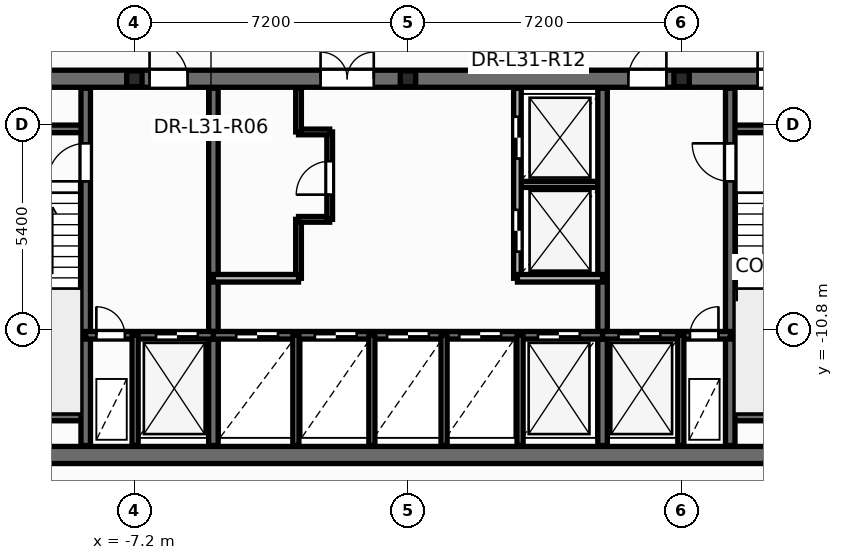
"""IFC4 building model, lengths in metres.
Left out: names, types, materials, properties, quantities, classifications, styles, units other than length and angle.
Written with IfcOpenShell. Run it as: python <this file> out.ifc"""

import sys

from ifc_helpers import new_model, si_unit, direction, frame, frame_2d, origin, origin_2d, place, context, subcontext, project, spatial, rectangle, i_section, extrude, element, fill, save


model = new_model("IFC4")
c1 = context("Model", 3, precision=1e-05, world=origin(), true_north=direction((0.0, 1.0)))
c2 = subcontext(c1, "Body", "Model", "MODEL_VIEW")
j1 = project(units=[si_unit("LENGTHUNIT", "METRE"), si_unit("PLANEANGLEUNIT", "RADIAN")], contexts=[c1])
p1 = place(None, origin())
s1 = spatial("IfcSite", under=j1, at=p1, CompositionType="ELEMENT")
p2 = place(p1, origin())
s2 = spatial("IfcBuilding", under=s1, at=p2, CompositionType="ELEMENT")
p3 = place(p2, frame((0.0, 0.0, 122.1)))
s3 = spatial("IfcBuildingStorey", under=s2, at=p3, CompositionType="ELEMENT", Elevation=122.1)
for number, where, z_axis, x_axis in (
    (1, (-7.2, -4.2, 0.0), (0.0, 0.0, 1.0), (1.0, 0.0, 0.0)),
    (2, (0.0, -4.2, 0.0), (0.0, 0.0, 1.0), (1.0, 0.0, 0.0)),
    (3, (7.2, -4.2, 0.0), (0.0, 0.0, 1.0), (1.0, 0.0, 0.0)),
):
    element("IfcColumn", number, at=place(p3, frame(where, z_axis=z_axis, x_axis=x_axis)), inside=s3, PredefinedType="PILASTER", context=c2, shape_type="SweptSolid", body=[
        extrude(i_section(OverallWidth=0.405, OverallDepth=0.414, WebThickness=0.022, FlangeThickness=0.032, at=origin_2d()), origin(), (0.0, 0.0, 1.0), 3.6),
    ])
p4 = place(p3, frame((-2.88, -9.45, 0.0), z_axis=(0.0, 0.0, 1.0), x_axis=(0.0, 1.0, 0.0)))
e4 = element("IfcWall", 4, at=p4, inside=s3, PredefinedType="PARTITIONING", context=c2, shape_type="SweptSolid", body=[
    extrude(rectangle(XDim=1.55, YDim=0.15, at=frame_2d((0.775, 0.0))), origin(), (0.0, 0.0, 1.0), 3.35),
])
p5 = place(p3, frame((-2.88, -7.9, 0.0), z_axis=(0.0, 0.0, 1.0), x_axis=(1.0, 0.0, 0.0)))
e5 = element("IfcWall", 5, at=p5, inside=s3, PredefinedType="PARTITIONING", context=c2, shape_type="SweptSolid", body=[
    extrude(rectangle(XDim=0.82, YDim=0.15, at=frame_2d((0.41, 0.0))), origin(), (0.0, 0.0, 1.0), 3.35),
])
p6 = place(p3, frame((-2.06, -7.9, 0.0), z_axis=(0.0, 0.0, 1.0), x_axis=(0.0, 1.0, 0.0)))
e6 = element("IfcWall", 6, at=p6, inside=s3, PredefinedType="PARTITIONING", context=c2, shape_type="SweptSolid", body=[
    extrude(rectangle(XDim=2.3, YDim=0.15, at=frame_2d((1.15, 0.0))), origin(), (0.0, 0.0, 1.0), 3.35),
])
p7 = place(p6, frame((0.65, 0.0, 0.0)))
e7 = element("IfcOpeningElement", 7, at=p7, cuts=e6, PredefinedType="OPENING", context=c2, shape_type="SweptSolid", body=[
    extrude(rectangle(XDim=0.886, YDim=2.104, at=frame_2d((0.44, 1.052))), frame((0.0, 0.085, 0.0), z_axis=(0.0, -1.0, 0.0), x_axis=(1.0, 0.0, 0.0)), (0.0, 0.0, 1.0), 0.17),
])
p8 = place(p3, frame((-2.88, -5.6, 0.0), z_axis=(0.0, 0.0, 1.0), x_axis=(1.0, 0.0, 0.0)))
e8 = element("IfcWall", 8, at=p8, inside=s3, PredefinedType="PARTITIONING", context=c2, shape_type="SweptSolid", body=[
    extrude(rectangle(XDim=0.82, YDim=0.15, at=frame_2d((0.41, 0.0))), origin(), (0.0, 0.0, 1.0), 3.35),
])
p9 = place(p3, frame((-2.88, -5.6, 0.0), z_axis=(0.0, 0.0, 1.0), x_axis=(0.0, 1.0, 0.0)))
e9 = element("IfcWall", 9, at=p9, inside=s3, PredefinedType="PARTITIONING", context=c2, shape_type="SweptSolid", body=[
    extrude(rectangle(XDim=1.15, YDim=0.15, at=frame_2d((0.575, 0.0))), origin(), (0.0, 0.0, 1.0), 3.35),
])
p10 = place(p3, frame((2.88, -6.98, 0.0), z_axis=(0.0, 0.0, 1.0), x_axis=(1.0, 0.0, 0.0)))
e10 = element("IfcWall", 10, at=p10, inside=s3, PredefinedType="PARTITIONING", context=c2, shape_type="SweptSolid", body=[
    extrude(rectangle(XDim=2.24, YDim=0.16, at=frame_2d((1.12, 0.0))), origin(), (0.0, 0.0, 1.0), 3.35),
])
p11 = place(p3, frame((-12.65, -14.1, 0.0), z_axis=(0.0, 0.0, 1.0), x_axis=(1.0, 0.0, 0.0)))
e11 = element("IfcWall", 11, at=p11, inside=s3, PredefinedType="SHEAR", context=c2, shape_type="SweptSolid", body=[
    extrude(rectangle(XDim=25.3, YDim=0.45, at=frame_2d((12.65, 0.0))), origin(), (0.0, 0.0, 1.0), 3.6),
])
p12 = place(p3, frame((-12.65, -4.2, 0.0), z_axis=(0.0, 0.0, 1.0), x_axis=(1.0, 0.0, 0.0)))
e12 = element("IfcWall", 12, at=p12, inside=s3, PredefinedType="SHEAR", context=c2, shape_type="SweptSolid", body=[
    extrude(rectangle(XDim=25.3, YDim=0.45, at=frame_2d((12.65, 0.0))), origin(), (0.0, 0.0, 1.0), 3.6),
])
p13 = place(p12, frame((1.85, 0.0, 0.0)))
e13 = element("IfcOpeningElement", 13, at=p13, cuts=e12, PredefinedType="OPENING", context=c2, shape_type="SweptSolid", body=[
    extrude(rectangle(XDim=0.756, YDim=2.054, at=frame_2d((0.375, 1.027))), frame((0.0, 0.235, 0.0), z_axis=(0.0, -1.0, 0.0), x_axis=(1.0, 0.0, 0.0)), (0.0, 0.0, 1.0), 0.47),
])
p14 = place(p12, frame((21.85, 0.0, 0.0)))
e14 = element("IfcOpeningElement", 14, at=p14, cuts=e12, PredefinedType="OPENING", context=c2, shape_type="SweptSolid", body=[
    extrude(rectangle(XDim=0.756, YDim=2.054, at=frame_2d((0.375, 1.027))), frame((0.0, 0.235, 0.0), z_axis=(0.0, -1.0, 0.0), x_axis=(1.0, 0.0, 0.0)), (0.0, 0.0, 1.0), 0.47),
])
p15 = place(p12, frame((23.5, 0.0, 0.0)))
e15 = element("IfcOpeningElement", 15, at=p15, cuts=e12, PredefinedType="OPENING", context=c2, shape_type="SweptSolid", body=[
    extrude(rectangle(XDim=0.756, YDim=2.054, at=frame_2d((0.375, 1.027))), frame((0.0, 0.235, 0.0), z_axis=(0.0, -1.0, 0.0), x_axis=(1.0, 0.0, 0.0)), (0.0, 0.0, 1.0), 0.47),
])
p16 = place(p12, frame((5.85, 0.0, 0.0)))
e16 = element("IfcOpeningElement", 16, at=p16, cuts=e12, PredefinedType="OPENING", context=c2, shape_type="SweptSolid", body=[
    extrude(rectangle(XDim=1.006, YDim=2.104, at=frame_2d((0.5, 1.052))), frame((0.0, 0.235, 0.0), z_axis=(0.0, -1.0, 0.0), x_axis=(1.0, 0.0, 0.0)), (0.0, 0.0, 1.0), 0.47),
])
p17 = place(p12, frame((10.35, 0.0, 0.0)))
e17 = element("IfcOpeningElement", 17, at=p17, cuts=e12, PredefinedType="OPENING", context=c2, shape_type="SweptSolid", body=[
    extrude(rectangle(XDim=1.406, YDim=2.154, at=frame_2d((0.7, 1.077))), frame((0.0, 0.235, 0.0), z_axis=(0.0, -1.0, 0.0), x_axis=(1.0, 0.0, 0.0)), (0.0, 0.0, 1.0), 0.47),
])
p18 = place(p12, frame((18.45, 0.0, 0.0)))
e18 = element("IfcOpeningElement", 18, at=p18, cuts=e12, PredefinedType="OPENING", context=c2, shape_type="SweptSolid", body=[
    extrude(rectangle(XDim=1.006, YDim=2.104, at=frame_2d((0.5, 1.052))), frame((0.0, 0.235, 0.0), z_axis=(0.0, -1.0, 0.0), x_axis=(1.0, 0.0, 0.0)), (0.0, 0.0, 1.0), 0.47),
])
for number, where, z_axis, x_axis in (
    (19, (-12.35, -5.52, 0.0), (0.0, 0.0, 1.0), (1.0, 0.0, 0.0)),
    (20, (-12.35, -13.1, 0.0), (0.0, 0.0, 1.0), (1.0, 0.0, 0.0)),
    (21, (8.48, -5.52, 0.0), (0.0, 0.0, 1.0), (1.0, 0.0, 0.0)),
    (22, (8.48, -13.1, 0.0), (0.0, 0.0, 1.0), (1.0, 0.0, 0.0)),
):
    element("IfcWall", number, at=place(p3, frame(where, z_axis=z_axis, x_axis=x_axis)), inside=s3, PredefinedType="SOLIDWALL", context=c2, shape_type="SweptSolid", body=[
        extrude(rectangle(XDim=3.87, YDim=0.2, at=frame_2d((1.935, 0.0))), origin(), (0.0, 0.0, 1.0), 3.6),
    ])
p19 = place(p3, frame((-8.48, -13.85, 0.0), z_axis=(0.0, 0.0, 1.0), x_axis=(0.0, 1.0, 0.0)))
e23 = element("IfcWall", 23, at=p19, inside=s3, PredefinedType="SHEAR", context=c2, shape_type="SweptSolid", body=[
    extrude(rectangle(XDim=9.4, YDim=0.25, at=frame_2d((4.7, 0.0))), origin(), (0.0, 0.0, 1.0), 3.6),
])
p20 = place(p19, frame((6.95, 0.0, 0.0)))
e24 = element("IfcOpeningElement", 24, at=p20, cuts=e23, PredefinedType="OPENING", context=c2, shape_type="SweptSolid", body=[
    extrude(rectangle(XDim=1.006, YDim=2.104, at=frame_2d((0.5, 1.052))), frame((0.0, 0.135, 0.0), z_axis=(0.0, -1.0, 0.0), x_axis=(1.0, 0.0, 0.0)), (0.0, 0.0, 1.0), 0.27),
])
p21 = place(p3, frame((8.48, -13.85, 0.0), z_axis=(0.0, 0.0, 1.0), x_axis=(0.0, 1.0, 0.0)))
e25 = element("IfcWall", 25, at=p21, inside=s3, PredefinedType="SHEAR", context=c2, shape_type="SweptSolid", body=[
    extrude(rectangle(XDim=9.4, YDim=0.25, at=frame_2d((4.7, 0.0))), origin(), (0.0, 0.0, 1.0), 3.6),
])
p22 = place(p21, frame((6.95, 0.0, 0.0)))
e26 = element("IfcOpeningElement", 26, at=p22, cuts=e25, PredefinedType="OPENING", context=c2, shape_type="SweptSolid", body=[
    extrude(rectangle(XDim=1.006, YDim=2.104, at=frame_2d((0.5, 1.052))), frame((0.0, 0.135, 0.0), z_axis=(0.0, -1.0, 0.0), x_axis=(1.0, 0.0, 0.0)), (0.0, 0.0, 1.0), 0.27),
])
for number, where, z_axis, x_axis in (
    (27, (-5.12, -13.85, 0.0), (0.0, 0.0, 1.0), (0.0, 1.0, 0.0)),
    (28, (5.12, -13.85, 0.0), (0.0, 0.0, 1.0), (0.0, 1.0, 0.0)),
):
    element("IfcWall", number, at=place(p3, frame(where, z_axis=z_axis, x_axis=x_axis)), inside=s3, PredefinedType="SHEAR", context=c2, shape_type="SweptSolid", body=[
        extrude(rectangle(XDim=9.4, YDim=0.25, at=frame_2d((4.7, 0.0))), origin(), (0.0, 0.0, 1.0), 3.6),
    ])
p23 = place(p3, frame((-8.48, -10.95, 0.0), z_axis=(0.0, 0.0, 1.0), x_axis=(1.0, 0.0, 0.0)))
e29 = element("IfcWall", 29, at=p23, inside=s3, PredefinedType="SOLIDWALL", context=c2, shape_type="SweptSolid", body=[
    extrude(rectangle(XDim=3.36, YDim=0.2, at=frame_2d((1.68, 0.0))), origin(), (0.0, 0.0, 1.0), 3.6),
])
p24 = place(p23, frame((0.28, 0.0, 0.0)))
e30 = element("IfcOpeningElement", 30, at=p24, cuts=e29, PredefinedType="OPENING", context=c2, shape_type="SweptSolid", body=[
    extrude(rectangle(XDim=0.756, YDim=2.054, at=frame_2d((0.375, 1.027))), frame((0.0, 0.11, 0.0), z_axis=(0.0, -1.0, 0.0), x_axis=(1.0, 0.0, 0.0)), (0.0, 0.0, 1.0), 0.22),
])
p25 = place(p23, frame((1.85, 0.0, 0.0)))
e31 = element("IfcOpeningElement", 31, at=p25, cuts=e29, PredefinedType="OPENING", context=c2, shape_type="SweptSolid", body=[
    extrude(rectangle(XDim=1.106, YDim=2.104, at=frame_2d((0.55, 1.052))), frame((0.0, 0.11, 0.0), z_axis=(0.0, -1.0, 0.0), x_axis=(1.0, 0.0, 0.0)), (0.0, 0.0, 1.0), 0.22),
])
p26 = place(p3, frame((-5.12, -10.95, 0.0), z_axis=(0.0, 0.0, 1.0), x_axis=(1.0, 0.0, 0.0)))
e32 = element("IfcWall", 32, at=p26, inside=s3, PredefinedType="SOLIDWALL", context=c2, shape_type="SweptSolid", body=[
    extrude(rectangle(XDim=10.24, YDim=0.2, at=frame_2d((5.12, 0.0))), origin(), (0.0, 0.0, 1.0), 3.6),
])
p27 = place(p26, frame((0.6, 0.0, 0.0)))
e33 = element("IfcOpeningElement", 33, at=p27, cuts=e32, PredefinedType="OPENING", context=c2, shape_type="SweptSolid", body=[
    extrude(rectangle(XDim=1.106, YDim=2.104, at=frame_2d((0.55, 1.052))), frame((0.0, 0.11, 0.0), z_axis=(0.0, -1.0, 0.0), x_axis=(1.0, 0.0, 0.0)), (0.0, 0.0, 1.0), 0.22),
])
p28 = place(p26, frame((2.67, 0.0, 0.0)))
e34 = element("IfcOpeningElement", 34, at=p28, cuts=e32, PredefinedType="OPENING", context=c2, shape_type="SweptSolid", body=[
    extrude(rectangle(XDim=1.106, YDim=2.104, at=frame_2d((0.55, 1.052))), frame((0.0, 0.11, 0.0), z_axis=(0.0, -1.0, 0.0), x_axis=(1.0, 0.0, 0.0)), (0.0, 0.0, 1.0), 0.22),
])
p29 = place(p26, frame((4.57, 0.0, 0.0)))
e35 = element("IfcOpeningElement", 35, at=p29, cuts=e32, PredefinedType="OPENING", context=c2, shape_type="SweptSolid", body=[
    extrude(rectangle(XDim=1.106, YDim=2.104, at=frame_2d((0.55, 1.052))), frame((0.0, 0.11, 0.0), z_axis=(0.0, -1.0, 0.0), x_axis=(1.0, 0.0, 0.0)), (0.0, 0.0, 1.0), 0.22),
])
p30 = place(p26, frame((6.47, 0.0, 0.0)))
e36 = element("IfcOpeningElement", 36, at=p30, cuts=e32, PredefinedType="OPENING", context=c2, shape_type="SweptSolid", body=[
    extrude(rectangle(XDim=1.106, YDim=2.104, at=frame_2d((0.55, 1.052))), frame((0.0, 0.11, 0.0), z_axis=(0.0, -1.0, 0.0), x_axis=(1.0, 0.0, 0.0)), (0.0, 0.0, 1.0), 0.22),
])
p31 = place(p26, frame((8.54, 0.0, 0.0)))
e37 = element("IfcOpeningElement", 37, at=p31, cuts=e32, PredefinedType="OPENING", context=c2, shape_type="SweptSolid", body=[
    extrude(rectangle(XDim=1.106, YDim=2.104, at=frame_2d((0.55, 1.052))), frame((0.0, 0.11, 0.0), z_axis=(0.0, -1.0, 0.0), x_axis=(1.0, 0.0, 0.0)), (0.0, 0.0, 1.0), 0.22),
])
p32 = place(p3, frame((5.12, -10.95, 0.0), z_axis=(0.0, 0.0, 1.0), x_axis=(1.0, 0.0, 0.0)))
e38 = element("IfcWall", 38, at=p32, inside=s3, PredefinedType="SOLIDWALL", context=c2, shape_type="SweptSolid", body=[
    extrude(rectangle(XDim=3.36, YDim=0.2, at=frame_2d((1.68, 0.0))), origin(), (0.0, 0.0, 1.0), 3.6),
])
p33 = place(p32, frame((0.42, 0.0, 0.0)))
e39 = element("IfcOpeningElement", 39, at=p33, cuts=e38, PredefinedType="OPENING", context=c2, shape_type="SweptSolid", body=[
    extrude(rectangle(XDim=1.106, YDim=2.104, at=frame_2d((0.55, 1.052))), frame((0.0, 0.11, 0.0), z_axis=(0.0, -1.0, 0.0), x_axis=(1.0, 0.0, 0.0)), (0.0, 0.0, 1.0), 0.22),
])
p34 = place(p32, frame((2.3, 0.0, 0.0)))
e40 = element("IfcOpeningElement", 40, at=p34, cuts=e38, PredefinedType="OPENING", context=c2, shape_type="SweptSolid", body=[
    extrude(rectangle(XDim=0.756, YDim=2.054, at=frame_2d((0.375, 1.027))), frame((0.0, 0.11, 0.0), z_axis=(0.0, -1.0, 0.0), x_axis=(1.0, 0.0, 0.0)), (0.0, 0.0, 1.0), 0.22),
])
for number, where, z_axis, x_axis in (
    (41, (-7.18, -13.85, 0.0), (0.0, 0.0, 1.0), (0.0, 1.0, 0.0)),
    (42, (7.18, -13.85, 0.0), (0.0, 0.0, 1.0), (0.0, 1.0, 0.0)),
    (43, (-2.95, -13.85, 0.0), (0.0, 0.0, 1.0), (0.0, 1.0, 0.0)),
    (44, (2.95, -13.85, 0.0), (0.0, 0.0, 1.0), (0.0, 1.0, 0.0)),
):
    element("IfcWall", number, at=place(p3, frame(where, z_axis=z_axis, x_axis=x_axis)), inside=s3, PredefinedType="PARTITIONING", context=c2, shape_type="SweptSolid", body=[
        extrude(rectangle(XDim=2.9, YDim=0.16, at=frame_2d((1.45, 0.0))), origin(), (0.0, 0.0, 1.0), 2.475),
    ])
p35 = place(p3, frame((-5.12, -9.45, 0.0), z_axis=(0.0, 0.0, 1.0), x_axis=(1.0, 0.0, 0.0)))
e45 = element("IfcWall", 45, at=p35, inside=s3, PredefinedType="SOLIDWALL", context=c2, shape_type="SweptSolid", body=[
    extrude(rectangle(XDim=2.24, YDim=0.2, at=frame_2d((1.12, 0.0))), origin(), (0.0, 0.0, 1.0), 3.35),
])
p36 = place(p3, frame((2.88, -9.45, 0.0), z_axis=(0.0, 0.0, 1.0), x_axis=(0.0, 1.0, 0.0)))
e46 = element("IfcWall", 46, at=p36, inside=s3, PredefinedType="SOLIDWALL", context=c2, shape_type="SweptSolid", body=[
    extrude(rectangle(XDim=5.0, YDim=0.2, at=frame_2d((2.5, 0.0))), origin(), (0.0, 0.0, 1.0), 3.35),
])
p37 = place(p36, frame((0.7, 0.0, 0.0)))
e47 = element("IfcOpeningElement", 47, at=p37, cuts=e46, PredefinedType="OPENING", context=c2, shape_type="SweptSolid", body=[
    extrude(rectangle(XDim=1.106, YDim=2.104, at=frame_2d((0.55, 1.052))), frame((0.0, 0.11, 0.0), z_axis=(0.0, -1.0, 0.0), x_axis=(1.0, 0.0, 0.0)), (0.0, 0.0, 1.0), 0.22),
])
p38 = place(p36, frame((3.15, 0.0, 0.0)))
e48 = element("IfcOpeningElement", 48, at=p38, cuts=e46, PredefinedType="OPENING", context=c2, shape_type="SweptSolid", body=[
    extrude(rectangle(XDim=1.106, YDim=2.104, at=frame_2d((0.55, 1.052))), frame((0.0, 0.11, 0.0), z_axis=(0.0, -1.0, 0.0), x_axis=(1.0, 0.0, 0.0)), (0.0, 0.0, 1.0), 0.22),
])
p39 = place(p3, frame((2.88, -9.45, 0.0), z_axis=(0.0, 0.0, 1.0), x_axis=(1.0, 0.0, 0.0)))
e49 = element("IfcWall", 49, at=p39, inside=s3, PredefinedType="SOLIDWALL", context=c2, shape_type="SweptSolid", body=[
    extrude(rectangle(XDim=2.24, YDim=0.2, at=frame_2d((1.12, 0.0))), origin(), (0.0, 0.0, 1.0), 3.35),
])
for number, where, z_axis, x_axis in (
    (50, (-0.95, -13.85, 0.0), (0.0, 0.0, 1.0), (0.0, 1.0, 0.0)),
    (51, (0.95, -13.85, 0.0), (0.0, 0.0, 1.0), (0.0, 1.0, 0.0)),
):
    element("IfcWall", number, at=place(p3, frame(where, z_axis=z_axis, x_axis=x_axis)), inside=s3, PredefinedType="PARTITIONING", context=c2, shape_type="SweptSolid", body=[
        extrude(rectangle(XDim=2.9, YDim=0.16, at=frame_2d((1.45, 0.0))), origin(), (0.0, 0.0, 1.0), 2.475),
    ])
p40 = place(p7, origin())
e52 = element("IfcDoor", 52, at=p40, inside=s3, OperationType="SINGLE_SWING_LEFT", PredefinedType="DOOR", context=c2, shape_type="SweptSolid", body=[
    extrude(rectangle(XDim=0.88, YDim=2.1, at=frame_2d((0.44, 1.05))), frame((0.0, 0.025, 0.0), z_axis=(0.0, -1.0, 0.0), x_axis=(1.0, 0.0, 0.0)), (0.0, 0.0, 1.0), 0.05),
])
fill(e7, e52)
p41 = place(p37, origin())
e53 = element("IfcDoor", 53, at=p41, inside=s3, OperationType="DOUBLE_DOOR_SLIDING", PredefinedType="DOOR", context=c2, shape_type="SweptSolid", body=[
    extrude(rectangle(XDim=1.1, YDim=2.1, at=frame_2d((0.55, 1.05))), frame((0.0, 0.025, 0.0), z_axis=(0.0, -1.0, 0.0), x_axis=(1.0, 0.0, 0.0)), (0.0, 0.0, 1.0), 0.05),
])
fill(e47, e53)
p42 = place(p38, origin())
e54 = element("IfcDoor", 54, at=p42, inside=s3, OperationType="DOUBLE_DOOR_SLIDING", PredefinedType="DOOR", context=c2, shape_type="SweptSolid", body=[
    extrude(rectangle(XDim=1.1, YDim=2.1, at=frame_2d((0.55, 1.05))), frame((0.0, 0.025, 0.0), z_axis=(0.0, -1.0, 0.0), x_axis=(1.0, 0.0, 0.0)), (0.0, 0.0, 1.0), 0.05),
])
fill(e48, e54)
p43 = place(p20, origin())
e55 = element("IfcDoor", 55, at=p43, inside=s3, OperationType="SINGLE_SWING_LEFT", PredefinedType="DOOR", context=c2, shape_type="SweptSolid", body=[
    extrude(rectangle(XDim=1.0, YDim=2.1, at=frame_2d((0.5, 1.05))), frame((0.0, 0.025, 0.0), z_axis=(0.0, -1.0, 0.0), x_axis=(1.0, 0.0, 0.0)), (0.0, 0.0, 1.0), 0.05),
])
fill(e24, e55)
p44 = place(p22, origin())
e56 = element("IfcDoor", 56, at=p44, inside=s3, OperationType="SINGLE_SWING_RIGHT", PredefinedType="DOOR", context=c2, shape_type="SweptSolid", body=[
    extrude(rectangle(XDim=1.0, YDim=2.1, at=frame_2d((0.5, 1.05))), frame((0.0, 0.025, 0.0), z_axis=(0.0, -1.0, 0.0), x_axis=(1.0, 0.0, 0.0)), (0.0, 0.0, 1.0), 0.05),
])
fill(e26, e56)
p45 = place(p24, origin())
e57 = element("IfcDoor", 57, at=p45, inside=s3, OperationType="SINGLE_SWING_LEFT", PredefinedType="DOOR", context=c2, shape_type="SweptSolid", body=[
    extrude(rectangle(XDim=0.75, YDim=2.05, at=frame_2d((0.375, 1.025))), frame((0.0, 0.025, 0.0), z_axis=(0.0, -1.0, 0.0), x_axis=(1.0, 0.0, 0.0)), (0.0, 0.0, 1.0), 0.05),
])
fill(e30, e57)
p46 = place(p25, origin())
e58 = element("IfcDoor", 58, at=p46, inside=s3, OperationType="DOUBLE_DOOR_SLIDING", PredefinedType="DOOR", context=c2, shape_type="SweptSolid", body=[
    extrude(rectangle(XDim=1.1, YDim=2.1, at=frame_2d((0.55, 1.05))), frame((0.0, 0.025, 0.0), z_axis=(0.0, -1.0, 0.0), x_axis=(1.0, 0.0, 0.0)), (0.0, 0.0, 1.0), 0.05),
])
fill(e31, e58)
p47 = place(p33, origin())
e59 = element("IfcDoor", 59, at=p47, inside=s3, OperationType="DOUBLE_DOOR_SLIDING", PredefinedType="DOOR", context=c2, shape_type="SweptSolid", body=[
    extrude(rectangle(XDim=1.1, YDim=2.1, at=frame_2d((0.55, 1.05))), frame((0.0, 0.025, 0.0), z_axis=(0.0, -1.0, 0.0), x_axis=(1.0, 0.0, 0.0)), (0.0, 0.0, 1.0), 0.05),
])
fill(e39, e59)
p48 = place(p34, origin())
e60 = element("IfcDoor", 60, at=p48, inside=s3, OperationType="SINGLE_SWING_RIGHT", PredefinedType="DOOR", context=c2, shape_type="SweptSolid", body=[
    extrude(rectangle(XDim=0.75, YDim=2.05, at=frame_2d((0.375, 1.025))), frame((0.0, 0.025, 0.0), z_axis=(0.0, -1.0, 0.0), x_axis=(1.0, 0.0, 0.0)), (0.0, 0.0, 1.0), 0.05),
])
fill(e40, e60)
p49 = place(p27, origin())
e61 = element("IfcDoor", 61, at=p49, inside=s3, OperationType="DOUBLE_DOOR_SLIDING", PredefinedType="DOOR", context=c2, shape_type="SweptSolid", body=[
    extrude(rectangle(XDim=1.1, YDim=2.1, at=frame_2d((0.55, 1.05))), frame((0.0, 0.025, 0.0), z_axis=(0.0, -1.0, 0.0), x_axis=(1.0, 0.0, 0.0)), (0.0, 0.0, 1.0), 0.05),
])
fill(e33, e61)
p50 = place(p28, origin())
e62 = element("IfcDoor", 62, at=p50, inside=s3, OperationType="DOUBLE_DOOR_SLIDING", PredefinedType="DOOR", context=c2, shape_type="SweptSolid", body=[
    extrude(rectangle(XDim=1.1, YDim=2.1, at=frame_2d((0.55, 1.05))), frame((0.0, 0.025, 0.0), z_axis=(0.0, -1.0, 0.0), x_axis=(1.0, 0.0, 0.0)), (0.0, 0.0, 1.0), 0.05),
])
fill(e34, e62)
p51 = place(p29, origin())
e63 = element("IfcDoor", 63, at=p51, inside=s3, OperationType="DOUBLE_DOOR_SLIDING", PredefinedType="DOOR", context=c2, shape_type="SweptSolid", body=[
    extrude(rectangle(XDim=1.1, YDim=2.1, at=frame_2d((0.55, 1.05))), frame((0.0, 0.025, 0.0), z_axis=(0.0, -1.0, 0.0), x_axis=(1.0, 0.0, 0.0)), (0.0, 0.0, 1.0), 0.05),
])
fill(e35, e63)
p52 = place(p30, origin())
e64 = element("IfcDoor", 64, at=p52, inside=s3, OperationType="DOUBLE_DOOR_SLIDING", PredefinedType="DOOR", context=c2, shape_type="SweptSolid", body=[
    extrude(rectangle(XDim=1.1, YDim=2.1, at=frame_2d((0.55, 1.05))), frame((0.0, 0.025, 0.0), z_axis=(0.0, -1.0, 0.0), x_axis=(1.0, 0.0, 0.0)), (0.0, 0.0, 1.0), 0.05),
])
fill(e36, e64)
p53 = place(p31, origin())
e65 = element("IfcDoor", 65, at=p53, inside=s3, OperationType="DOUBLE_DOOR_SLIDING", PredefinedType="DOOR", context=c2, shape_type="SweptSolid", body=[
    extrude(rectangle(XDim=1.1, YDim=2.1, at=frame_2d((0.55, 1.05))), frame((0.0, 0.025, 0.0), z_axis=(0.0, -1.0, 0.0), x_axis=(1.0, 0.0, 0.0)), (0.0, 0.0, 1.0), 0.05),
])
fill(e37, e65)
p54 = place(p14, origin())
e66 = element("IfcDoor", 66, at=p54, inside=s3, OperationType="SINGLE_SWING_LEFT", PredefinedType="DOOR", context=c2, shape_type="SweptSolid", body=[
    extrude(rectangle(XDim=0.75, YDim=2.05, at=frame_2d((0.375, 1.025))), frame((0.0, 0.025, 0.0), z_axis=(0.0, -1.0, 0.0), x_axis=(1.0, 0.0, 0.0)), (0.0, 0.0, 1.0), 0.05),
])
fill(e14, e66)
p55 = place(p16, origin())
e67 = element("IfcDoor", 67, at=p55, inside=s3, OperationType="SINGLE_SWING_LEFT", PredefinedType="DOOR", context=c2, shape_type="SweptSolid", body=[
    extrude(rectangle(XDim=1.0, YDim=2.1, at=frame_2d((0.5, 1.05))), frame((0.0, 0.025, 0.0), z_axis=(0.0, -1.0, 0.0), x_axis=(1.0, 0.0, 0.0)), (0.0, 0.0, 1.0), 0.05),
])
fill(e16, e67)
p56 = place(p17, origin())
e68 = element("IfcDoor", 68, at=p56, inside=s3, OperationType="DOUBLE_DOOR_SINGLE_SWING", PredefinedType="DOOR", context=c2, shape_type="SweptSolid", body=[
    extrude(rectangle(XDim=1.4, YDim=2.15, at=frame_2d((0.7, 1.075))), frame((0.0, 0.025, 0.0), z_axis=(0.0, -1.0, 0.0), x_axis=(1.0, 0.0, 0.0)), (0.0, 0.0, 1.0), 0.05),
])
fill(e17, e68)
p57 = place(p18, origin())
e69 = element("IfcDoor", 69, at=p57, inside=s3, OperationType="SINGLE_SWING_RIGHT", PredefinedType="DOOR", context=c2, shape_type="SweptSolid", body=[
    extrude(rectangle(XDim=1.0, YDim=2.1, at=frame_2d((0.5, 1.05))), frame((0.0, 0.025, 0.0), z_axis=(0.0, -1.0, 0.0), x_axis=(1.0, 0.0, 0.0)), (0.0, 0.0, 1.0), 0.05),
])
fill(e18, e69)
save(model, sys.argv[1])
